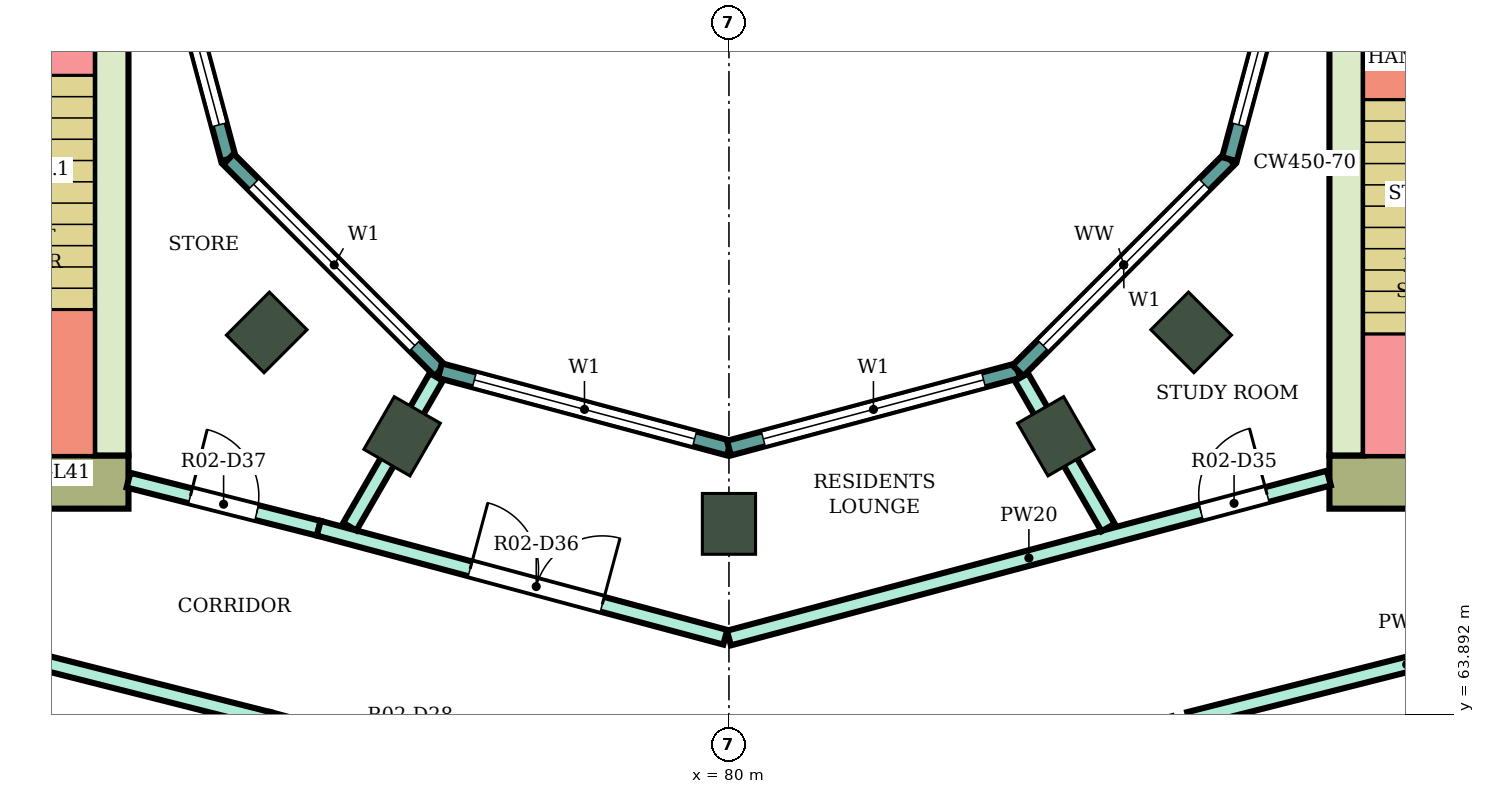
"""IFC4 building model, lengths in metres.
Left out: names, types, materials, properties, quantities, classifications, styles, units other than length and angle.
Written with IfcOpenShell. Run it as: python <this file> out.ifc"""

import sys

from ifc_helpers import new_model, si_unit, direction, frame, frame_2d, origin, origin_2d, place, context, subcontext, project, spatial, rectangle, extrude, element, fill, save


model = new_model("IFC4")
c1 = context("Model", 3, precision=1e-05, world=origin(), true_north=direction((0.0, 1.0)))
c2 = subcontext(c1, "Body", "Model", "MODEL_VIEW")
j1 = project(units=[si_unit("LENGTHUNIT", "METRE"), si_unit("PLANEANGLEUNIT", "RADIAN")], contexts=[c1])
p1 = place(None, origin())
s1 = spatial("IfcSite", under=j1, at=p1, CompositionType="ELEMENT")
p2 = place(p1, origin())
s2 = spatial("IfcBuilding", under=s1, at=p2, CompositionType="ELEMENT")
p3 = place(p2, frame((0.0, 0.0, 178.2)))
s3 = spatial("IfcBuildingStorey", under=s2, at=p3, CompositionType="ELEMENT", Elevation=178.2)
for number, where, z_axis, x_axis in (
    (1, (73.919, 68.919, 0.0), (0.0, 0.0, 1.0), (-0.707, -0.707, 0.0)),
    (2, (75.7, 67.552, 0.0), (0.0, 0.0, 1.0), (-0.5, -0.866, 0.0)),
    (3, (80.0, 66.4, 0.0), (0.0, 0.0, 1.0), (0.0, -1.0, 0.0)),
    (4, (84.3, 67.552, 0.0), (0.0, 0.0, 1.0), (0.5, -0.866, 0.0)),
    (5, (86.081, 68.919, 0.0), (0.0, 0.0, 1.0), (0.707, -0.707, 0.0)),
):
    element("IfcColumn", number, at=place(p3, frame(where, z_axis=z_axis, x_axis=x_axis)), inside=s3, PredefinedType="COLUMN", context=c2, shape_type="SweptSolid", body=[
        extrude(rectangle(XDim=0.8, YDim=0.7, at=origin_2d()), origin(), (0.0, 0.0, 1.0), 4.1),
    ])
p4 = place(p3, frame((87.9, 66.95, 0.0), z_axis=(0.0, 0.0, 1.0), x_axis=(1.0, 0.0, 0.0)))
e6 = element("IfcWall", 6, at=p4, inside=s3, PredefinedType="SHEAR", context=c2, shape_type="SweptSolid", body=[
    extrude(rectangle(XDim=14.8, YDim=0.7, at=frame_2d((7.4, 0.0))), origin(), (0.0, 0.0, 1.0), 3.78),
])
p5 = place(p4, frame((4.2, 0.0, 0.0)))
e7 = element("IfcOpeningElement", 7, at=p5, cuts=e6, PredefinedType="OPENING", context=c2, shape_type="SweptSolid", body=[
    extrude(rectangle(XDim=2.4, YDim=2.4, at=frame_2d((1.2, 1.2))), frame((0.0, 0.36, 0.0), z_axis=(0.0, -1.0, 0.0), x_axis=(1.0, 0.0, 0.0)), (0.0, 0.0, 1.0), 0.72),
])
p6 = place(p3, frame((88.125, 67.3, 0.0), z_axis=(0.0, 0.0, 1.0), x_axis=(0.0, 1.0, 0.0)))
e8 = element("IfcWall", 8, at=p6, inside=s3, PredefinedType="SHEAR", context=c2, shape_type="SweptSolid", body=[
    extrude(rectangle(XDim=7.7, YDim=0.45, at=frame_2d((3.85, 0.0))), origin(), (0.0, 0.0, 1.0), 3.78),
])
p7 = place(p3, frame((72.1, 66.95, 0.0), z_axis=(0.0, 0.0, 1.0), x_axis=(-1.0, 0.0, 0.0)))
e9 = element("IfcWall", 9, at=p7, inside=s3, PredefinedType="SHEAR", context=c2, shape_type="SweptSolid", body=[
    extrude(rectangle(XDim=14.8, YDim=0.7, at=frame_2d((7.4, 0.0))), origin(), (0.0, 0.0, 1.0), 3.78),
])
p8 = place(p7, frame((4.2, 0.0, 0.0)))
e10 = element("IfcOpeningElement", 10, at=p8, cuts=e9, PredefinedType="OPENING", context=c2, shape_type="SweptSolid", body=[
    extrude(rectangle(XDim=2.4, YDim=2.4, at=frame_2d((1.2, 1.2))), frame((0.0, 0.36, 0.0), z_axis=(0.0, -1.0, 0.0), x_axis=(1.0, 0.0, 0.0)), (0.0, 0.0, 1.0), 0.72),
])
p9 = place(p3, frame((71.875, 75.0, 0.0), z_axis=(0.0, 0.0, 1.0), x_axis=(0.0, -1.0, 0.0)))
e11 = element("IfcWall", 11, at=p9, inside=s3, PredefinedType="SHEAR", context=c2, shape_type="SweptSolid", body=[
    extrude(rectangle(XDim=7.7, YDim=0.45, at=frame_2d((3.85, 0.0))), origin(), (0.0, 0.0, 1.0), 3.78),
])
p10 = place(p3, frame((72.396, 75.0, 0.0), z_axis=(0.0, 0.0, 1.0), x_axis=(0.258789828301, -0.965933654434, 0.0)))
e12 = element("IfcWall", 12, at=p10, inside=s3, PredefinedType="NOTDEFINED", context=c2, shape_type="SweptSolid", body=[
    extrude(rectangle(XDim=3.936, YDim=0.2, at=frame_2d((1.968, 0.0))), origin(), (0.0, 0.0, 1.0), 4.1),
])
p11 = place(p10, frame((0.468, 0.0, 0.9)))
e13 = element("IfcOpeningElement", 13, at=p11, cuts=e12, PredefinedType="OPENING", context=c2, shape_type="SweptSolid", body=[
    extrude(rectangle(XDim=3.0, YDim=2.3, at=frame_2d((1.5, 1.15))), frame((0.0, 0.11, 0.0), z_axis=(0.0, -1.0, 0.0), x_axis=(1.0, 0.0, 0.0)), (0.0, 0.0, 1.0), 0.22),
])
p12 = place(p3, frame((73.415, 71.198, 0.0), z_axis=(0.0, 0.0, 1.0), x_axis=(0.707106781187, -0.707106781187, 0.0)))
e14 = element("IfcWall", 14, at=p12, inside=s3, PredefinedType="NOTDEFINED", context=c2, shape_type="SweptSolid", body=[
    extrude(rectangle(XDim=3.936, YDim=0.2, at=frame_2d((1.968, 0.0))), origin(), (0.0, 0.0, 1.0), 4.1),
])
p13 = place(p12, frame((0.468, 0.0, 0.9)))
e15 = element("IfcOpeningElement", 15, at=p13, cuts=e14, PredefinedType="OPENING", context=c2, shape_type="SweptSolid", body=[
    extrude(rectangle(XDim=3.0, YDim=2.3, at=frame_2d((1.5, 1.15))), frame((0.0, 0.11, 0.0), z_axis=(0.0, -1.0, 0.0), x_axis=(1.0, 0.0, 0.0)), (0.0, 0.0, 1.0), 0.22),
])
p14 = place(p3, frame((76.198, 68.415, 0.0), z_axis=(0.0, 0.0, 1.0), x_axis=(0.965933654434, -0.258789828301, 0.0)))
e16 = element("IfcWall", 16, at=p14, inside=s3, PredefinedType="NOTDEFINED", context=c2, shape_type="SweptSolid", body=[
    extrude(rectangle(XDim=3.936, YDim=0.2, at=frame_2d((1.968, 0.0))), origin(), (0.0, 0.0, 1.0), 4.1),
])
p15 = place(p14, frame((0.468, 0.0, 0.9)))
e17 = element("IfcOpeningElement", 17, at=p15, cuts=e16, PredefinedType="OPENING", context=c2, shape_type="SweptSolid", body=[
    extrude(rectangle(XDim=3.0, YDim=2.3, at=frame_2d((1.5, 1.15))), frame((0.0, 0.11, 0.0), z_axis=(0.0, -1.0, 0.0), x_axis=(1.0, 0.0, 0.0)), (0.0, 0.0, 1.0), 0.22),
])
p16 = place(p3, frame((80.0, 67.396, 0.0), z_axis=(0.0, 0.0, 1.0), x_axis=(0.965933654434, 0.258789828301, 0.0)))
e18 = element("IfcWall", 18, at=p16, inside=s3, PredefinedType="NOTDEFINED", context=c2, shape_type="SweptSolid", body=[
    extrude(rectangle(XDim=3.936, YDim=0.2, at=frame_2d((1.968, 0.0))), origin(), (0.0, 0.0, 1.0), 4.1),
])
p17 = place(p16, frame((0.468, 0.0, 0.9)))
e19 = element("IfcOpeningElement", 19, at=p17, cuts=e18, PredefinedType="OPENING", context=c2, shape_type="SweptSolid", body=[
    extrude(rectangle(XDim=3.0, YDim=2.3, at=frame_2d((1.5, 1.15))), frame((0.0, 0.11, 0.0), z_axis=(0.0, -1.0, 0.0), x_axis=(1.0, 0.0, 0.0)), (0.0, 0.0, 1.0), 0.22),
])
p18 = place(p3, frame((83.802, 68.415, 0.0), z_axis=(0.0, 0.0, 1.0), x_axis=(0.707106781187, 0.707106781187, 0.0)))
e20 = element("IfcWall", 20, at=p18, inside=s3, PredefinedType="NOTDEFINED", context=c2, shape_type="SweptSolid", body=[
    extrude(rectangle(XDim=3.936, YDim=0.2, at=frame_2d((1.968, 0.0))), origin(), (0.0, 0.0, 1.0), 4.1),
])
p19 = place(p18, frame((0.468, 0.0, 0.9)))
e21 = element("IfcOpeningElement", 21, at=p19, cuts=e20, PredefinedType="OPENING", context=c2, shape_type="SweptSolid", body=[
    extrude(rectangle(XDim=3.0, YDim=2.3, at=frame_2d((1.5, 1.15))), frame((0.0, 0.11, 0.0), z_axis=(0.0, -1.0, 0.0), x_axis=(1.0, 0.0, 0.0)), (0.0, 0.0, 1.0), 0.22),
])
p20 = place(p3, frame((86.585, 71.198, 0.0), z_axis=(0.0, 0.0, 1.0), x_axis=(0.258789828301, 0.965933654434, 0.0)))
e22 = element("IfcWall", 22, at=p20, inside=s3, PredefinedType="NOTDEFINED", context=c2, shape_type="SweptSolid", body=[
    extrude(rectangle(XDim=3.936, YDim=0.2, at=frame_2d((1.968, 0.0))), origin(), (0.0, 0.0, 1.0), 4.1),
])
p21 = place(p20, frame((0.468, 0.0, 0.9)))
e23 = element("IfcOpeningElement", 23, at=p21, cuts=e22, PredefinedType="OPENING", context=c2, shape_type="SweptSolid", body=[
    extrude(rectangle(XDim=3.0, YDim=2.3, at=frame_2d((1.5, 1.15))), frame((0.0, 0.11, 0.0), z_axis=(0.0, -1.0, 0.0), x_axis=(1.0, 0.0, 0.0)), (0.0, 0.0, 1.0), 0.22),
])
p22 = place(p3, frame((69.86, 64.86, 0.0), z_axis=(0.0, 0.0, 1.0), x_axis=(0.96942980222, -0.245368821506, 0.0)))
e24 = element("IfcWall", 24, at=p22, inside=s3, PredefinedType="PARTITIONING", context=c2, shape_type="SweptSolid", body=[
    extrude(rectangle(XDim=4.216, YDim=0.2, at=frame_2d((2.108, 0.0))), origin(), (0.0, 0.0, 1.0), 3.65),
])
p23 = place(p3, frame((72.1, 66.975, 0.0), z_axis=(0.0, 0.0, 1.0), x_axis=(0.969471314457, -0.245204752086, 0.0)))
e25 = element("IfcWall", 25, at=p23, inside=s3, PredefinedType="PARTITIONING", context=c2, shape_type="SweptSolid", body=[
    extrude(rectangle(XDim=2.582, YDim=0.2, at=frame_2d((1.291, 0.0))), origin(), (0.0, 0.0, 1.0), 3.65),
])
p24 = place(p23, frame((0.841, 0.0, 0.0)))
e26 = element("IfcOpeningElement", 26, at=p24, cuts=e25, PredefinedType="OPENING", context=c2, shape_type="SweptSolid", body=[
    extrude(rectangle(XDim=0.9, YDim=2.1, at=frame_2d((0.45, 1.05))), frame((0.0, 0.11, 0.0), z_axis=(0.0, -1.0, 0.0), x_axis=(1.0, 0.0, 0.0)), (0.0, 0.0, 1.0), 0.22),
])
p25 = place(p3, frame((73.947, 63.826, 0.0), z_axis=(0.0, 0.0, 1.0), x_axis=(0.965908253407, -0.258884619088, 0.0)))
e27 = element("IfcWall", 27, at=p25, inside=s3, PredefinedType="PARTITIONING", context=c2, shape_type="SweptSolid", body=[
    extrude(rectangle(XDim=6.217, YDim=0.2, at=frame_2d((3.108, 0.0))), origin(), (0.0, 0.0, 1.0), 3.65),
])
p26 = place(p25, frame((1.424, 0.0, 0.0)))
e28 = element("IfcOpeningElement", 28, at=p26, cuts=e27, PredefinedType="OPENING", context=c2, shape_type="SweptSolid", body=[
    extrude(rectangle(XDim=1.0, YDim=2.1, at=frame_2d((0.5, 1.05))), frame((0.0, 0.11, 0.0), z_axis=(0.0, -1.0, 0.0), x_axis=(1.0, 0.0, 0.0)), (0.0, 0.0, 1.0), 0.22),
])
p27 = place(p3, frame((74.603, 66.342, 0.0), z_axis=(0.0, 0.0, 1.0), x_axis=(0.965895298152, -0.258932950796, 0.0)))
e29 = element("IfcWall", 29, at=p27, inside=s3, PredefinedType="PARTITIONING", context=c2, shape_type="SweptSolid", body=[
    extrude(rectangle(XDim=5.538, YDim=0.2, at=frame_2d((2.769, 0.0))), origin(), (0.0, 0.0, 1.0), 3.65),
])
p28 = place(p27, frame((2.062, 0.0, 0.0)))
e30 = element("IfcOpeningElement", 30, at=p28, cuts=e29, PredefinedType="OPENING", context=c2, shape_type="SweptSolid", body=[
    extrude(rectangle(XDim=1.8, YDim=2.1, at=frame_2d((0.9, 1.05))), frame((0.0, 0.11, 0.0), z_axis=(0.0, -1.0, 0.0), x_axis=(1.0, 0.0, 0.0)), (0.0, 0.0, 1.0), 0.22),
])
p29 = place(p3, frame((75.012, 66.363, 0.0), z_axis=(0.0, 0.0, 1.0), x_axis=(0.500168489725, 0.86592810434, 0.0)))
e31 = element("IfcWall", 31, at=p29, inside=s3, PredefinedType="PARTITIONING", context=c2, shape_type="SweptSolid", body=[
    extrude(rectangle(XDim=2.274, YDim=0.2, at=frame_2d((1.137, 0.0))), origin(), (0.0, 0.0, 1.0), 3.65),
])
p30 = place(p3, frame((80.0, 64.898, 0.0), z_axis=(0.0, 0.0, 1.0), x_axis=(0.966237419782, 0.257653349704, 0.0)))
e32 = element("IfcWall", 32, at=p30, inside=s3, PredefinedType="PARTITIONING", context=c2, shape_type="SweptSolid", body=[
    extrude(rectangle(XDim=8.169, YDim=0.2, at=frame_2d((4.084, 0.0))), origin(), (0.0, 0.0, 1.0), 3.65),
])
p31 = place(p30, frame((6.428, 0.0, 0.0)))
e33 = element("IfcOpeningElement", 33, at=p31, cuts=e32, PredefinedType="OPENING", context=c2, shape_type="SweptSolid", body=[
    extrude(rectangle(XDim=0.9, YDim=2.1, at=frame_2d((0.45, 1.05))), frame((0.0, 0.11, 0.0), z_axis=(0.0, -1.0, 0.0), x_axis=(1.0, 0.0, 0.0)), (0.0, 0.0, 1.0), 0.22),
])
p32 = place(p3, frame((83.847, 68.331, 0.0), z_axis=(0.0, 0.0, 1.0), x_axis=(0.499851978358, -0.866110847255, 0.0)))
e34 = element("IfcWall", 34, at=p32, inside=s3, PredefinedType="PARTITIONING", context=c2, shape_type="SweptSolid", body=[
    extrude(rectangle(XDim=2.284, YDim=0.2, at=frame_2d((1.142, 0.0))), origin(), (0.0, 0.0, 1.0), 3.65),
])
p33 = place(p3, frame((86.053, 63.826, 0.0), z_axis=(0.0, 0.0, 1.0), x_axis=(0.969490004987, 0.245130843083, 0.0)))
e35 = element("IfcWall", 35, at=p33, inside=s3, PredefinedType="PARTITIONING", context=c2, shape_type="SweptSolid", body=[
    extrude(rectangle(XDim=5.908, YDim=0.2, at=frame_2d((2.954, 0.0))), origin(), (0.0, 0.0, 1.0), 3.65),
])
p34 = place(p11, origin())
e36 = element("IfcWindow", 36, at=p34, inside=s3, PartitioningType="SINGLE_PANEL", PredefinedType="WINDOW", context=c2, shape_type="SweptSolid", body=[
    extrude(rectangle(XDim=3.0, YDim=2.3, at=frame_2d((1.5, 1.15))), frame((0.0, 0.03, 0.0), z_axis=(0.0, -1.0, 0.0), x_axis=(1.0, 0.0, 0.0)), (0.0, 0.0, 1.0), 0.06),
])
fill(e13, e36)
p35 = place(p13, origin())
e37 = element("IfcWindow", 37, at=p35, inside=s3, PartitioningType="SINGLE_PANEL", PredefinedType="WINDOW", context=c2, shape_type="SweptSolid", body=[
    extrude(rectangle(XDim=3.0, YDim=2.3, at=frame_2d((1.5, 1.15))), frame((0.0, 0.03, 0.0), z_axis=(0.0, -1.0, 0.0), x_axis=(1.0, 0.0, 0.0)), (0.0, 0.0, 1.0), 0.06),
])
fill(e15, e37)
p36 = place(p15, origin())
e38 = element("IfcWindow", 38, at=p36, inside=s3, PartitioningType="SINGLE_PANEL", PredefinedType="WINDOW", context=c2, shape_type="SweptSolid", body=[
    extrude(rectangle(XDim=3.0, YDim=2.3, at=frame_2d((1.5, 1.15))), frame((0.0, 0.03, 0.0), z_axis=(0.0, -1.0, 0.0), x_axis=(1.0, 0.0, 0.0)), (0.0, 0.0, 1.0), 0.06),
])
fill(e17, e38)
p37 = place(p17, origin())
e39 = element("IfcWindow", 39, at=p37, inside=s3, PartitioningType="SINGLE_PANEL", PredefinedType="WINDOW", context=c2, shape_type="SweptSolid", body=[
    extrude(rectangle(XDim=3.0, YDim=2.3, at=frame_2d((1.5, 1.15))), frame((0.0, 0.03, 0.0), z_axis=(0.0, -1.0, 0.0), x_axis=(1.0, 0.0, 0.0)), (0.0, 0.0, 1.0), 0.06),
])
fill(e19, e39)
p38 = place(p19, origin())
e40 = element("IfcWindow", 40, at=p38, inside=s3, PartitioningType="SINGLE_PANEL", PredefinedType="WINDOW", context=c2, shape_type="SweptSolid", body=[
    extrude(rectangle(XDim=3.0, YDim=2.3, at=frame_2d((1.5, 1.15))), frame((0.0, 0.03, 0.0), z_axis=(0.0, -1.0, 0.0), x_axis=(1.0, 0.0, 0.0)), (0.0, 0.0, 1.0), 0.06),
])
fill(e21, e40)
p39 = place(p21, origin())
e41 = element("IfcWindow", 41, at=p39, inside=s3, PartitioningType="SINGLE_PANEL", PredefinedType="WINDOW", context=c2, shape_type="SweptSolid", body=[
    extrude(rectangle(XDim=3.0, YDim=2.3, at=frame_2d((1.5, 1.15))), frame((0.0, 0.03, 0.0), z_axis=(0.0, -1.0, 0.0), x_axis=(1.0, 0.0, 0.0)), (0.0, 0.0, 1.0), 0.06),
])
fill(e23, e41)
p40 = place(p31, origin())
e42 = element("IfcDoor", 42, at=p40, inside=s3, OperationType="SINGLE_SWING_RIGHT", PredefinedType="DOOR", context=c2, shape_type="SweptSolid", body=[
    extrude(rectangle(XDim=0.9, YDim=2.1, at=frame_2d((0.45, 1.05))), frame((0.0, 0.025, 0.0), z_axis=(0.0, -1.0, 0.0), x_axis=(1.0, 0.0, 0.0)), (0.0, 0.0, 1.0), 0.05),
])
fill(e33, e42)
p41 = place(p28, origin())
e43 = element("IfcDoor", 43, at=p41, inside=s3, OperationType="DOUBLE_DOOR_SINGLE_SWING", PredefinedType="DOOR", context=c2, shape_type="SweptSolid", body=[
    extrude(rectangle(XDim=1.8, YDim=2.1, at=frame_2d((0.9, 1.05))), frame((0.0, 0.025, 0.0), z_axis=(0.0, -1.0, 0.0), x_axis=(1.0, 0.0, 0.0)), (0.0, 0.0, 1.0), 0.05),
])
fill(e30, e43)
p42 = place(p24, origin())
e44 = element("IfcDoor", 44, at=p42, inside=s3, OperationType="SINGLE_SWING_LEFT", PredefinedType="DOOR", context=c2, shape_type="SweptSolid", body=[
    extrude(rectangle(XDim=0.9, YDim=2.1, at=frame_2d((0.45, 1.05))), frame((0.0, 0.025, 0.0), z_axis=(0.0, -1.0, 0.0), x_axis=(1.0, 0.0, 0.0)), (0.0, 0.0, 1.0), 0.05),
])
fill(e26, e44)
save(model, sys.argv[1])
